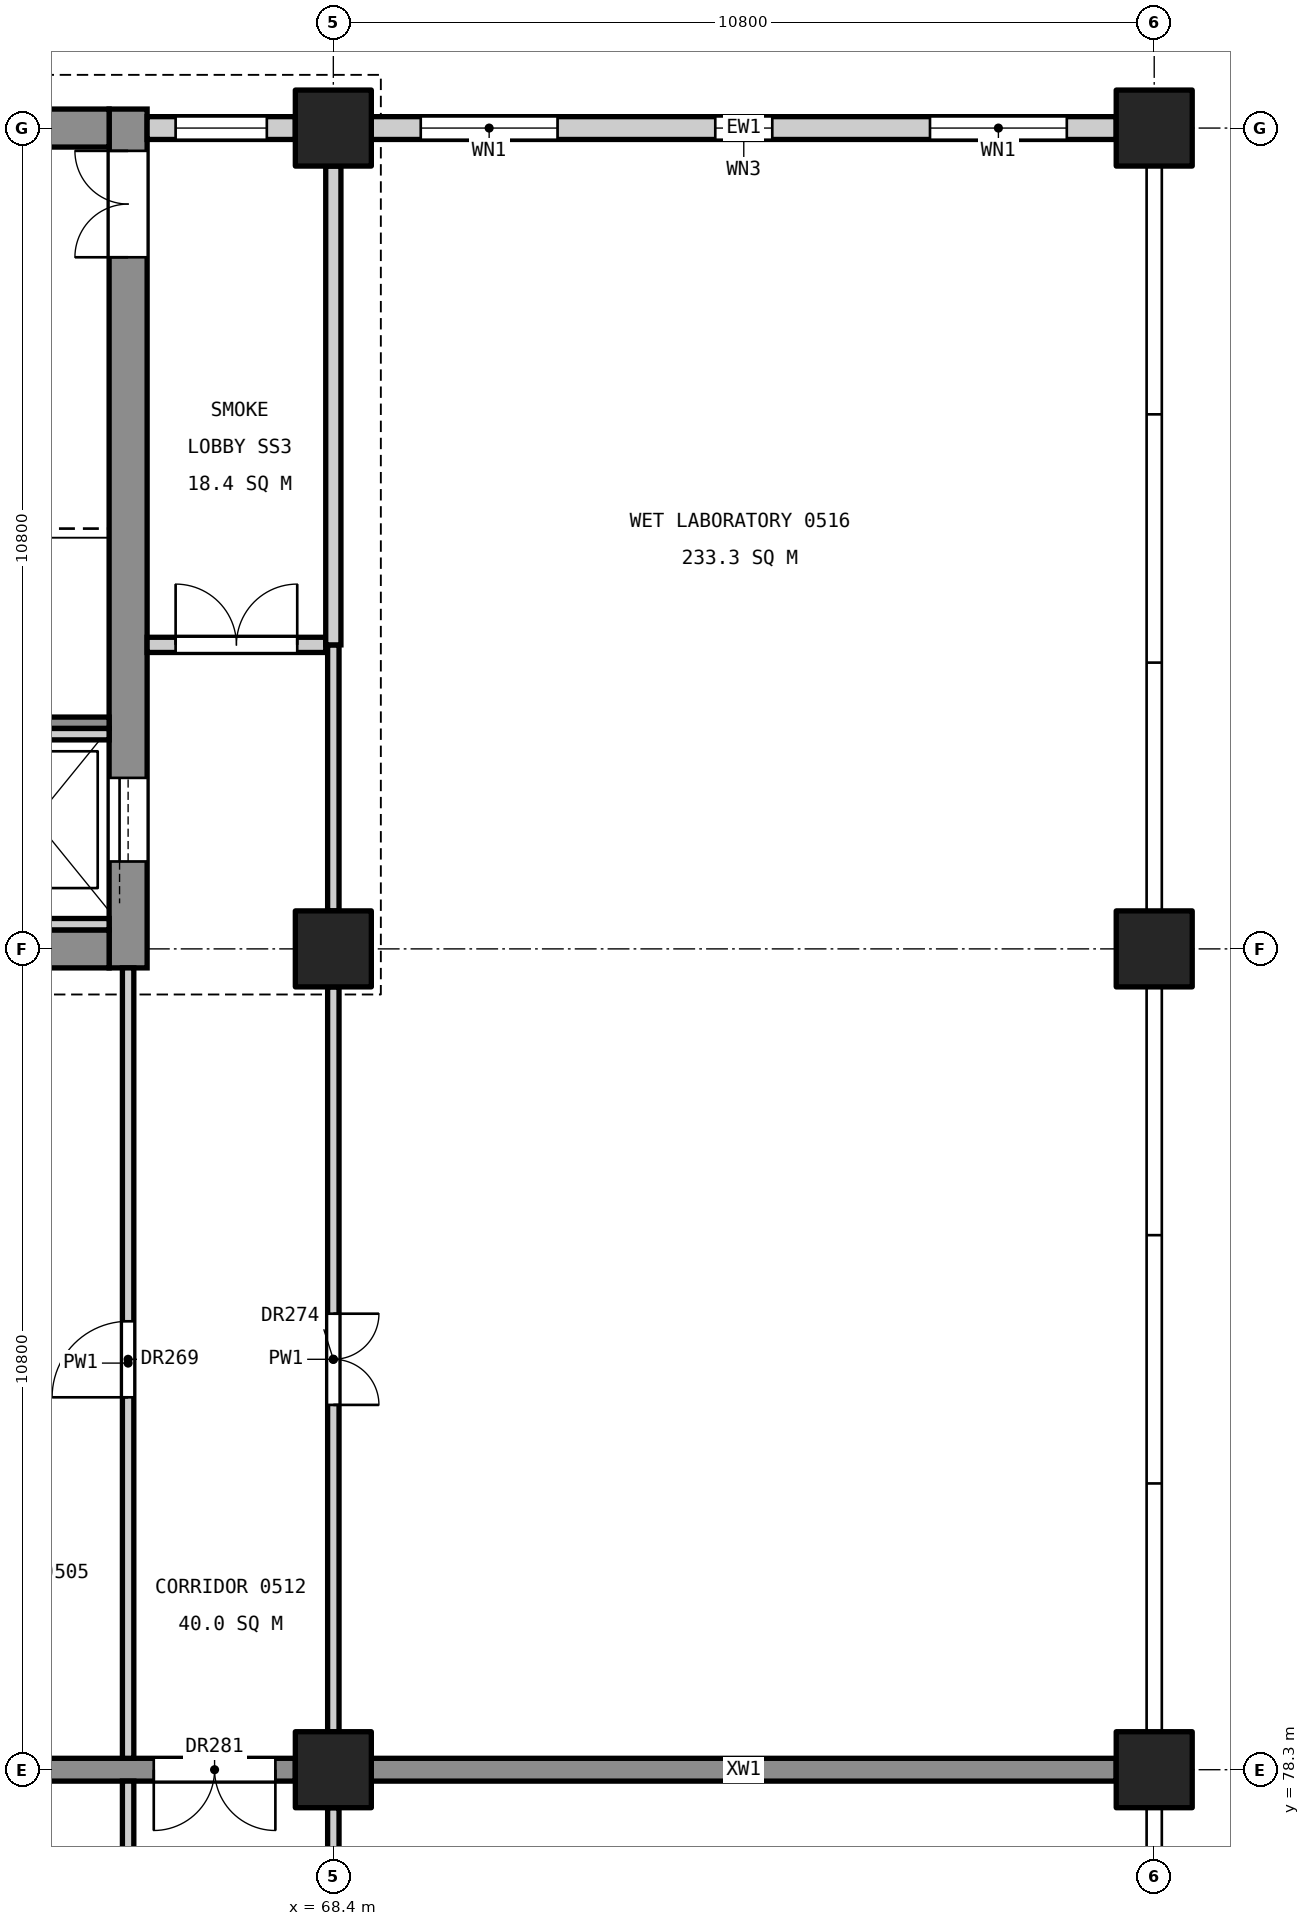
"""IFC4 building model, lengths in metres.
Left out: names, types, materials, properties, quantities, classifications, styles, units other than length and angle.
Written with IfcOpenShell. Run it as: python <this file> out.ifc"""

import sys

from ifc_helpers import new_model, si_unit, direction, frame, frame_2d, origin, origin_2d, place, context, subcontext, project, spatial, rectangle, extrude, element, fill, save


model = new_model("IFC4")
c1 = context("Model", 3, precision=1e-05, world=origin(), true_north=direction((0.0, 1.0)))
c2 = subcontext(c1, "Body", "Model", "MODEL_VIEW")
j1 = project(units=[si_unit("LENGTHUNIT", "METRE"), si_unit("PLANEANGLEUNIT", "RADIAN")], contexts=[c1])
p1 = place(None, origin())
s1 = spatial("IfcSite", under=j1, at=p1, CompositionType="ELEMENT")
p2 = place(p1, origin())
s2 = spatial("IfcBuilding", under=s1, at=p2, CompositionType="ELEMENT")
p3 = place(p2, frame((0.0, 0.0, 27.0)))
s3 = spatial("IfcBuildingStorey", under=s2, at=p3, CompositionType="ELEMENT", Elevation=27.0)
for number, where, z_axis, x_axis in (
    (1, (68.4, 78.3, 0.0), (0.0, 0.0, 1.0), (1.0, 0.0, 0.0)),
    (2, (68.4, 89.1, 0.0), (0.0, 0.0, 1.0), (1.0, 0.0, 0.0)),
    (3, (68.4, 99.9, 0.0), (0.0, 0.0, 1.0), (1.0, 0.0, 0.0)),
    (4, (79.2, 78.3, 0.0), (0.0, 0.0, 1.0), (1.0, 0.0, 0.0)),
    (5, (79.2, 89.1, 0.0), (0.0, 0.0, 1.0), (1.0, 0.0, 0.0)),
    (6, (79.2, 99.9, 0.0), (0.0, 0.0, 1.0), (1.0, 0.0, 0.0)),
):
    element("IfcColumn", number, at=place(p3, frame(where, z_axis=z_axis, x_axis=x_axis)), inside=s3, PredefinedType="COLUMN", context=c2, shape_type="SweptSolid", body=[
        extrude(rectangle(XDim=1.0, YDim=1.0, at=origin_2d()), origin(), (0.0, 0.0, 1.0), 4.8),
    ])
p4 = place(p3, frame((65.7, 88.85, 0.0), z_axis=(0.0, 0.0, 1.0), x_axis=(0.0, 1.0, 0.0)))
e7 = element("IfcWall", 7, at=p4, inside=s3, PredefinedType="SHEAR", context=c2, shape_type="SweptSolid", body=[
    extrude(rectangle(XDim=11.3, YDim=0.5, at=frame_2d((5.65, 0.0))), origin(), (0.0, 0.0, 1.0), 4.55),
])
p5 = place(p4, frame((9.35, 0.0, 0.0)))
e8 = element("IfcOpeningElement", 8, at=p5, cuts=e7, PredefinedType="OPENING", context=c2, shape_type="SweptSolid", body=[
    extrude(rectangle(XDim=1.4, YDim=2.1, at=frame_2d((0.7, 1.05))), frame((0.0, 0.26, 0.0), z_axis=(0.0, -1.0, 0.0), x_axis=(1.0, 0.0, 0.0)), (0.0, 0.0, 1.0), 0.52),
])
p6 = place(p4, frame((1.4, 0.0, 0.0)))
e9 = element("IfcOpeningElement", 9, at=p6, cuts=e7, PredefinedType="OPENING", context=c2, shape_type="SweptSolid", body=[
    extrude(rectangle(XDim=1.1, YDim=2.1, at=frame_2d((0.55, 1.05))), frame((0.0, 0.26, 0.0), z_axis=(0.0, -1.0, 0.0), x_axis=(1.0, 0.0, 0.0)), (0.0, 0.0, 1.0), 0.52),
])
p7 = place(p3, frame((61.45, 89.1, 0.0), z_axis=(0.0, 0.0, 1.0), x_axis=(1.0, 0.0, 0.0)))
e10 = element("IfcWall", 10, at=p7, inside=s3, PredefinedType="SHEAR", context=c2, shape_type="SweptSolid", body=[
    extrude(rectangle(XDim=4.0, YDim=0.5, at=frame_2d((2.0, 0.0))), origin(), (0.0, 0.0, 1.0), 4.55),
])
p8 = place(p3, frame((61.45, 99.9, 0.0), z_axis=(0.0, 0.0, 1.0), x_axis=(1.0, 0.0, 0.0)))
e11 = element("IfcWall", 11, at=p8, inside=s3, PredefinedType="SHEAR", context=c2, shape_type="SweptSolid", body=[
    extrude(rectangle(XDim=4.0, YDim=0.5, at=frame_2d((2.0, 0.0))), origin(), (0.0, 0.0, 1.0), 4.55),
])
p9 = place(p8, frame((1.4, 0.0, 3.4)))
e12 = element("IfcOpeningElement", 12, at=p9, cuts=e11, PredefinedType="OPENING", context=c2, shape_type="SweptSolid", body=[
    extrude(rectangle(XDim=1.2, YDim=0.9, at=frame_2d((0.6, 0.45))), frame((0.0, 0.26, 0.0), z_axis=(0.0, -1.0, 0.0), x_axis=(1.0, 0.0, 0.0)), (0.0, 0.0, 1.0), 0.52),
])
p10 = place(p3, frame((61.7, 78.3, 0.0), z_axis=(0.0, 0.0, 1.0), x_axis=(1.0, 0.0, 0.0)))
e13 = element("IfcWall", 13, at=p10, inside=s3, PredefinedType="SHEAR", context=c2, shape_type="SweptSolid", body=[
    extrude(rectangle(XDim=6.2, YDim=0.3, at=frame_2d((3.1, 0.0))), origin(), (0.0, 0.0, 1.0), 4.55),
])
p11 = place(p10, frame((4.337, 0.0, 0.0)))
e14 = element("IfcOpeningElement", 14, at=p11, cuts=e13, PredefinedType="OPENING", context=c2, shape_type="SweptSolid", body=[
    extrude(rectangle(XDim=1.6, YDim=2.1, at=frame_2d((0.8, 1.05))), frame((0.0, 0.16, 0.0), z_axis=(0.0, -1.0, 0.0), x_axis=(1.0, 0.0, 0.0)), (0.0, 0.0, 1.0), 0.32),
])
p12 = place(p3, frame((68.9, 78.3, 0.0), z_axis=(0.0, 0.0, 1.0), x_axis=(1.0, 0.0, 0.0)))
e15 = element("IfcWall", 15, at=p12, inside=s3, PredefinedType="SHEAR", context=c2, shape_type="SweptSolid", body=[
    extrude(rectangle(XDim=9.8, YDim=0.3, at=frame_2d((4.9, 0.0))), origin(), (0.0, 0.0, 1.0), 4.55),
])
p13 = place(p3, frame((61.45, 92.075, 0.0), z_axis=(0.0, 0.0, 1.0), x_axis=(1.0, 0.0, 0.0)))
e16 = element("IfcWall", 16, at=p13, inside=s3, PredefinedType="SOLIDWALL", context=c2, shape_type="SweptSolid", body=[
    extrude(rectangle(XDim=4.0, YDim=0.15, at=frame_2d((2.0, 0.0))), origin(), (0.0, 0.0, 1.0), 4.55),
])
for number, where, z_axis, x_axis in (
    (17, (63.65, 91.925, 0.0), (0.0, 0.0, 1.0), (1.0, 0.0, 0.0)),
    (18, (63.65, 89.425, 0.0), (0.0, 0.0, 1.0), (1.0, 0.0, 0.0)),
):
    element("IfcWall", number, at=place(p3, frame(where, z_axis=z_axis, x_axis=x_axis)), inside=s3, PredefinedType="SOLIDWALL", context=c2, shape_type="SweptSolid", body=[
        extrude(rectangle(XDim=1.8, YDim=0.15, at=frame_2d((0.9, 0.0))), origin(), (0.0, 0.0, 1.0), 4.8),
    ])
p14 = place(p3, frame((65.95, 99.9, 0.0), z_axis=(0.0, 0.0, 1.0), x_axis=(1.0, 0.0, 0.0)))
e19 = element("IfcWall", 19, at=p14, inside=s3, PredefinedType="STANDARD", context=c2, shape_type="SweptSolid", body=[
    extrude(rectangle(XDim=1.95, YDim=0.3, at=frame_2d((0.975, 0.0))), origin(), (0.0, 0.0, 1.0), 3.85),
])
p15 = place(p14, frame((0.375, 0.0, 0.9)))
e20 = element("IfcOpeningElement", 20, at=p15, cuts=e19, PredefinedType="OPENING", context=c2, shape_type="SweptSolid", body=[
    extrude(rectangle(XDim=1.2, YDim=2.4, at=frame_2d((0.6, 1.2))), frame((0.0, 0.16, 0.0), z_axis=(0.0, -1.0, 0.0), x_axis=(1.0, 0.0, 0.0)), (0.0, 0.0, 1.0), 0.32),
])
p16 = place(p3, frame((68.9, 99.9, 0.0), z_axis=(0.0, 0.0, 1.0), x_axis=(1.0, 0.0, 0.0)))
e21 = element("IfcWall", 21, at=p16, inside=s3, PredefinedType="STANDARD", context=c2, shape_type="SweptSolid", body=[
    extrude(rectangle(XDim=9.8, YDim=0.3, at=frame_2d((4.9, 0.0))), origin(), (0.0, 0.0, 1.0), 3.85),
])
p17 = place(p16, frame((0.65, 0.0, 0.9)))
e22 = element("IfcOpeningElement", 22, at=p17, cuts=e21, PredefinedType="OPENING", context=c2, shape_type="SweptSolid", body=[
    extrude(rectangle(XDim=1.8, YDim=2.4, at=frame_2d((0.9, 1.2))), frame((0.0, 0.16, 0.0), z_axis=(0.0, -1.0, 0.0), x_axis=(1.0, 0.0, 0.0)), (0.0, 0.0, 1.0), 0.32),
])
p18 = place(p16, frame((4.525, 0.0, 0.8)))
e23 = element("IfcOpeningElement", 23, at=p18, cuts=e21, PredefinedType="OPENING", context=c2, shape_type="SweptSolid", body=[
    extrude(rectangle(XDim=0.75, YDim=1.2, at=frame_2d((0.375, 0.6))), frame((0.0, 0.16, 0.0), z_axis=(0.0, -1.0, 0.0), x_axis=(1.0, 0.0, 0.0)), (0.0, 0.0, 1.0), 0.32),
])
p19 = place(p16, frame((7.35, 0.0, 0.9)))
e24 = element("IfcOpeningElement", 24, at=p19, cuts=e21, PredefinedType="OPENING", context=c2, shape_type="SweptSolid", body=[
    extrude(rectangle(XDim=1.8, YDim=2.4, at=frame_2d((0.9, 1.2))), frame((0.0, 0.16, 0.0), z_axis=(0.0, -1.0, 0.0), x_axis=(1.0, 0.0, 0.0)), (0.0, 0.0, 1.0), 0.32),
])
p20 = place(p3, frame((65.7, 74.95, 0.0), z_axis=(0.0, 0.0, 1.0), x_axis=(0.0, 1.0, 0.0)))
e25 = element("IfcWall", 25, at=p20, inside=s3, PredefinedType="PARTITIONING", context=c2, shape_type="SweptSolid", body=[
    extrude(rectangle(XDim=3.2, YDim=0.15, at=frame_2d((1.6, 0.0))), origin(), (0.0, 0.0, 1.0), 3.55),
])
p21 = place(p20, frame((1.05, 0.0, 0.0)))
e26 = element("IfcOpeningElement", 26, at=p21, cuts=e25, PredefinedType="OPENING", context=c2, shape_type="SweptSolid", body=[
    extrude(rectangle(XDim=1.0, YDim=2.1, at=frame_2d((0.5, 1.05))), frame((0.0, 0.085, 0.0), z_axis=(0.0, -1.0, 0.0), x_axis=(1.0, 0.0, 0.0)), (0.0, 0.0, 1.0), 0.17),
])
p22 = place(p3, frame((65.7, 78.45, 0.0), z_axis=(0.0, 0.0, 1.0), x_axis=(0.0, 1.0, 0.0)))
e27 = element("IfcWall", 27, at=p22, inside=s3, PredefinedType="PARTITIONING", context=c2, shape_type="SweptSolid", body=[
    extrude(rectangle(XDim=10.4, YDim=0.15, at=frame_2d((5.2, 0.0))), origin(), (0.0, 0.0, 1.0), 3.55),
])
p23 = place(p22, frame((4.75, 0.0, 0.0)))
e28 = element("IfcOpeningElement", 28, at=p23, cuts=e27, PredefinedType="OPENING", context=c2, shape_type="SweptSolid", body=[
    extrude(rectangle(XDim=1.0, YDim=2.1, at=frame_2d((0.5, 1.05))), frame((0.0, 0.085, 0.0), z_axis=(0.0, -1.0, 0.0), x_axis=(1.0, 0.0, 0.0)), (0.0, 0.0, 1.0), 0.17),
])
p24 = place(p3, frame((65.95, 93.1, 0.0), z_axis=(0.0, 0.0, 1.0), x_axis=(1.0, 0.0, 0.0)))
e29 = element("IfcWall", 29, at=p24, inside=s3, PredefinedType="PARTITIONING", context=c2, shape_type="SweptSolid", body=[
    extrude(rectangle(XDim=2.35, YDim=0.2, at=frame_2d((1.175, 0.0))), origin(), (0.0, 0.0, 1.0), 3.55),
])
p25 = place(p24, frame((0.375, 0.0, 0.0)))
e30 = element("IfcOpeningElement", 30, at=p25, cuts=e29, PredefinedType="OPENING", context=c2, shape_type="SweptSolid", body=[
    extrude(rectangle(XDim=1.6, YDim=2.1, at=frame_2d((0.8, 1.05))), frame((0.0, 0.11, 0.0), z_axis=(0.0, -1.0, 0.0), x_axis=(1.0, 0.0, 0.0)), (0.0, 0.0, 1.0), 0.22),
])
p26 = place(p3, frame((68.4, 70.8, 0.0), z_axis=(0.0, 0.0, 1.0), x_axis=(0.0, 1.0, 0.0)))
e31 = element("IfcWall", 31, at=p26, inside=s3, PredefinedType="PARTITIONING", context=c2, shape_type="SweptSolid", body=[
    extrude(rectangle(XDim=7.0, YDim=0.15, at=frame_2d((3.5, 0.0))), origin(), (0.0, 0.0, 1.0), 3.55),
])
p27 = place(p26, frame((2.9, 0.0, 0.0)))
e32 = element("IfcOpeningElement", 32, at=p27, cuts=e31, PredefinedType="OPENING", context=c2, shape_type="SweptSolid", body=[
    extrude(rectangle(XDim=1.2, YDim=2.1, at=frame_2d((0.6, 1.05))), frame((0.0, 0.085, 0.0), z_axis=(0.0, -1.0, 0.0), x_axis=(1.0, 0.0, 0.0)), (0.0, 0.0, 1.0), 0.17),
])
p28 = place(p3, frame((68.4, 78.8, 0.0), z_axis=(0.0, 0.0, 1.0), x_axis=(0.0, 1.0, 0.0)))
e33 = element("IfcWall", 33, at=p28, inside=s3, PredefinedType="PARTITIONING", context=c2, shape_type="SweptSolid", body=[
    extrude(rectangle(XDim=9.8, YDim=0.15, at=frame_2d((4.9, 0.0))), origin(), (0.0, 0.0, 1.0), 3.55),
])
p29 = place(p28, frame((4.3, 0.0, 0.0)))
e34 = element("IfcOpeningElement", 34, at=p29, cuts=e33, PredefinedType="OPENING", context=c2, shape_type="SweptSolid", body=[
    extrude(rectangle(XDim=1.2, YDim=2.1, at=frame_2d((0.6, 1.05))), frame((0.0, 0.085, 0.0), z_axis=(0.0, -1.0, 0.0), x_axis=(1.0, 0.0, 0.0)), (0.0, 0.0, 1.0), 0.17),
])
p30 = place(p3, frame((68.4, 89.6, 0.0), z_axis=(0.0, 0.0, 1.0), x_axis=(0.0, 1.0, 0.0)))
e35 = element("IfcWall", 35, at=p30, inside=s3, PredefinedType="PARTITIONING", context=c2, shape_type="SweptSolid", body=[
    extrude(rectangle(XDim=3.5, YDim=0.15, at=frame_2d((1.75, 0.0))), origin(), (0.0, 0.0, 1.0), 3.55),
])
p31 = place(p3, frame((68.4, 93.1, 0.0), z_axis=(0.0, 0.0, 1.0), x_axis=(0.0, 1.0, 0.0)))
e36 = element("IfcWall", 36, at=p31, inside=s3, PredefinedType="PARTITIONING", context=c2, shape_type="SweptSolid", body=[
    extrude(rectangle(XDim=6.3, YDim=0.2, at=frame_2d((3.15, 0.0))), origin(), (0.0, 0.0, 1.0), 3.55),
])
p32 = place(p5, origin())
e37 = element("IfcDoor", 37, at=p32, inside=s3, OperationType="DOUBLE_DOOR_SINGLE_SWING", PredefinedType="DOOR", context=c2, shape_type="SweptSolid", body=[
    extrude(rectangle(XDim=1.4, YDim=2.1, at=frame_2d((0.7, 1.05))), frame((0.0, 0.025, 0.0), z_axis=(0.0, -1.0, 0.0), x_axis=(1.0, 0.0, 0.0)), (0.0, 0.0, 1.0), 0.05),
])
fill(e8, e37)
p33 = place(p6, origin())
e38 = element("IfcDoor", 38, at=p33, inside=s3, OperationType="SLIDING_TO_LEFT", PredefinedType="DOOR", context=c2, shape_type="SweptSolid", body=[
    extrude(rectangle(XDim=1.1, YDim=2.1, at=frame_2d((0.55, 1.05))), frame((0.0, 0.025, 0.0), z_axis=(0.0, -1.0, 0.0), x_axis=(1.0, 0.0, 0.0)), (0.0, 0.0, 1.0), 0.05),
])
fill(e9, e38)
p34 = place(p15, origin())
e39 = element("IfcWindow", 39, at=p34, inside=s3, PartitioningType="SINGLE_PANEL", PredefinedType="WINDOW", context=c2, shape_type="SweptSolid", body=[
    extrude(rectangle(XDim=1.2, YDim=2.4, at=frame_2d((0.6, 1.2))), frame((0.0, 0.03, 0.0), z_axis=(0.0, -1.0, 0.0), x_axis=(1.0, 0.0, 0.0)), (0.0, 0.0, 1.0), 0.06),
])
fill(e20, e39)
p35 = place(p17, origin())
e40 = element("IfcWindow", 40, at=p35, inside=s3, PartitioningType="SINGLE_PANEL", PredefinedType="WINDOW", context=c2, shape_type="SweptSolid", body=[
    extrude(rectangle(XDim=1.8, YDim=2.4, at=frame_2d((0.9, 1.2))), frame((0.0, 0.03, 0.0), z_axis=(0.0, -1.0, 0.0), x_axis=(1.0, 0.0, 0.0)), (0.0, 0.0, 1.0), 0.06),
])
fill(e22, e40)
p36 = place(p18, origin())
e41 = element("IfcWindow", 41, at=p36, inside=s3, PartitioningType="SINGLE_PANEL", PredefinedType="WINDOW", context=c2, shape_type="SweptSolid", body=[
    extrude(rectangle(XDim=0.75, YDim=1.2, at=frame_2d((0.375, 0.6))), frame((0.0, 0.03, 0.0), z_axis=(0.0, -1.0, 0.0), x_axis=(1.0, 0.0, 0.0)), (0.0, 0.0, 1.0), 0.06),
])
fill(e23, e41)
p37 = place(p19, origin())
e42 = element("IfcWindow", 42, at=p37, inside=s3, PartitioningType="SINGLE_PANEL", PredefinedType="WINDOW", context=c2, shape_type="SweptSolid", body=[
    extrude(rectangle(XDim=1.8, YDim=2.4, at=frame_2d((0.9, 1.2))), frame((0.0, 0.03, 0.0), z_axis=(0.0, -1.0, 0.0), x_axis=(1.0, 0.0, 0.0)), (0.0, 0.0, 1.0), 0.06),
])
fill(e24, e42)
p38 = place(p23, origin())
e43 = element("IfcDoor", 43, at=p38, inside=s3, OperationType="SINGLE_SWING_LEFT", PredefinedType="DOOR", context=c2, shape_type="SweptSolid", body=[
    extrude(rectangle(XDim=1.0, YDim=2.1, at=frame_2d((0.5, 1.05))), frame((0.0, 0.025, 0.0), z_axis=(0.0, -1.0, 0.0), x_axis=(1.0, 0.0, 0.0)), (0.0, 0.0, 1.0), 0.05),
])
fill(e28, e43)
p39 = place(p29, frame((1.2, 0.0, 0.0), z_axis=(0.0, 0.0, 1.0), x_axis=(-1.0, 0.0, 0.0)))
e44 = element("IfcDoor", 44, at=p39, inside=s3, OperationType="DOUBLE_DOOR_SINGLE_SWING", PredefinedType="DOOR", context=c2, shape_type="SweptSolid", body=[
    extrude(rectangle(XDim=1.2, YDim=2.1, at=frame_2d((0.6, 1.05))), frame((0.0, 0.025, 0.0), z_axis=(0.0, -1.0, 0.0), x_axis=(1.0, 0.0, 0.0)), (0.0, 0.0, 1.0), 0.05),
])
fill(e34, e44)
p40 = place(p25, origin())
e45 = element("IfcDoor", 45, at=p40, inside=s3, OperationType="DOUBLE_DOOR_SINGLE_SWING", PredefinedType="DOOR", context=c2, shape_type="SweptSolid", body=[
    extrude(rectangle(XDim=1.6, YDim=2.1, at=frame_2d((0.8, 1.05))), frame((0.0, 0.025, 0.0), z_axis=(0.0, -1.0, 0.0), x_axis=(1.0, 0.0, 0.0)), (0.0, 0.0, 1.0), 0.05),
])
fill(e30, e45)
p41 = place(p11, frame((1.6, 0.0, 0.0), z_axis=(0.0, 0.0, 1.0), x_axis=(-1.0, 0.0, 0.0)))
e46 = element("IfcDoor", 46, at=p41, inside=s3, OperationType="DOUBLE_DOOR_SINGLE_SWING", PredefinedType="DOOR", context=c2, shape_type="SweptSolid", body=[
    extrude(rectangle(XDim=1.6, YDim=2.1, at=frame_2d((0.8, 1.05))), frame((0.0, 0.025, 0.0), z_axis=(0.0, -1.0, 0.0), x_axis=(1.0, 0.0, 0.0)), (0.0, 0.0, 1.0), 0.05),
])
fill(e14, e46)
save(model, sys.argv[1])
